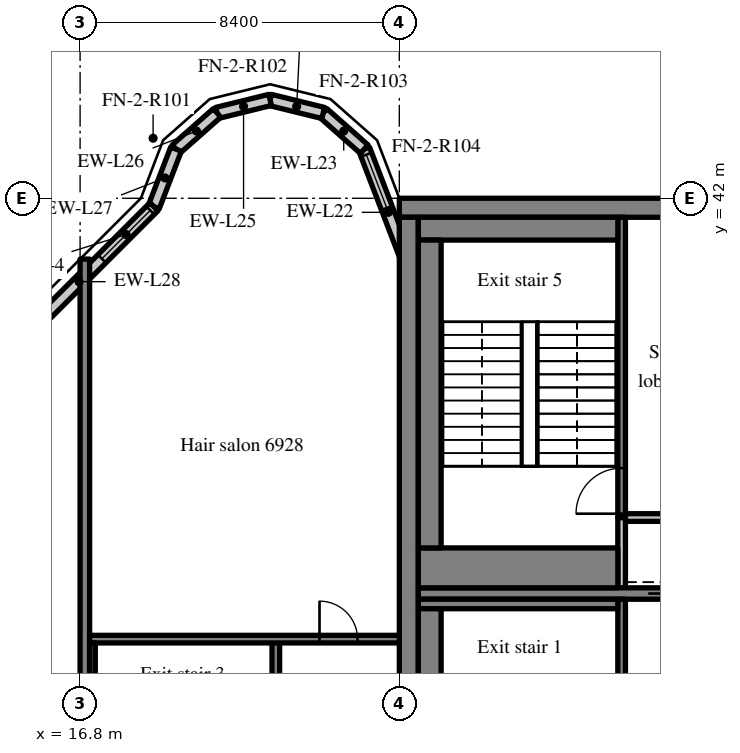
"""IFC4 building model, lengths in metres.
Left out: names, types, materials, properties, quantities, classifications, styles, units other than length and angle.
Written with IfcOpenShell. Run it as: python <this file> out.ifc"""

import sys

from ifc_helpers import new_model, si_unit, direction, frame, frame_2d, origin, place, context, subcontext, project, spatial, rectangle, extrude, source, transform, mapped, element, fill, save


model = new_model("IFC4")
c1 = context("Model", 3, precision=1e-05, world=origin(), true_north=direction((0.0, 1.0)))
c2 = subcontext(c1, "Body", "Model", "MODEL_VIEW")
j1 = project(units=[si_unit("LENGTHUNIT", "METRE"), si_unit("PLANEANGLEUNIT", "RADIAN")], contexts=[c1])
p1 = place(None, origin())
s1 = spatial("IfcSite", under=j1, at=p1, CompositionType="ELEMENT")
p2 = place(p1, origin())
s2 = spatial("IfcBuilding", under=s1, at=p2, CompositionType="ELEMENT")
p3 = place(p2, frame((0.0, 0.0, 289.7)))
s3 = spatial("IfcBuildingStorey", under=s2, at=p3, CompositionType="ELEMENT", Elevation=289.7)
m1 = source(origin(), c2, "Body", "SweptSolid", [
    extrude(rectangle(XDim=50.4, YDim=0.5, at=frame_2d((25.2, 0.0))), origin(), (0.0, 0.0, 1.0), 3.72),
])
p4 = place(p3, frame((25.2, 41.75, 0.0), z_axis=(0.0, 0.0, 1.0), x_axis=(1.0, 0.0, 0.0)))
e1 = element("IfcWall", 1, at=p4, inside=s3, PredefinedType="SHEAR", context=c2, shape_type="MappedRepresentation", body=[
    mapped(m1, transform((0.0, 0.0, 0.0), scale=1.0)),
])
m2 = source(origin(), c2, "Body", "SweptSolid", [
    extrude(rectangle(XDim=19.0, YDim=0.5, at=frame_2d((9.5, 0.0))), origin(), (0.0, 0.0, 1.0), 3.72),
])
p5 = place(p3, frame((25.45, 22.5, 0.0), z_axis=(0.0, 0.0, 1.0), x_axis=(0.0, 1.0, 0.0)))
e2 = element("IfcWall", 2, at=p5, inside=s3, PredefinedType="SHEAR", context=c2, shape_type="MappedRepresentation", body=[
    mapped(m2, transform((0.0, 0.0, 0.0), scale=1.0)),
])
m3 = source(origin(), c2, "Body", "SweptSolid", [
    extrude(rectangle(XDim=7.75, YDim=0.3, at=frame_2d((3.875, 0.0))), origin(), (0.0, 0.0, 1.0), 3.72),
])
p6 = place(p3, frame((25.7, 31.6, 0.0), z_axis=(0.0, 0.0, 1.0), x_axis=(1.0, 0.0, 0.0)))
e3 = element("IfcWall", 3, at=p6, inside=s3, PredefinedType="SHEAR", context=c2, shape_type="MappedRepresentation", body=[
    mapped(m3, transform((0.0, 0.0, 0.0), scale=1.0)),
])
m4 = source(origin(), c2, "Body", "SweptSolid", [
    extrude(rectangle(XDim=1.1, YDim=2.1, at=frame_2d((0.55, 1.05))), frame((0.0, 0.16, 0.0), z_axis=(0.0, -1.0, 0.0), x_axis=(1.0, 0.0, 0.0)), (0.0, 0.0, 1.0), 0.32),
])
p7 = place(p6, frame((6.05, 0.0, 0.0)))
e4 = element("IfcOpeningElement", 4, at=p7, cuts=e3, PredefinedType="OPENING", context=c2, shape_type="MappedRepresentation", body=[
    mapped(m4, transform((0.0, 0.0, 0.0), scale=1.0)),
])
m5 = source(origin(), c2, "Body", "SweptSolid", [
    extrude(rectangle(XDim=18.4, YDim=0.25, at=frame_2d((9.2, 0.0))), origin(), (0.0, 0.0, 1.0), 3.72),
])
p8 = place(p3, frame((16.925, 22.0, 0.0), z_axis=(0.0, 0.0, 1.0), x_axis=(0.0, 1.0, 0.0)))
e5 = element("IfcWall", 5, at=p8, inside=s3, PredefinedType="SHEAR", context=c2, shape_type="MappedRepresentation", body=[
    mapped(m5, transform((0.0, 0.0, 0.0), scale=1.0)),
])
m6 = source(origin(), c2, "Body", "SweptSolid", [
    extrude(rectangle(XDim=3.559, YDim=0.3, at=frame_2d((1.78, 0.0))), origin(), (0.0, 0.0, 1.0), 3.72),
])
p9 = place(p3, frame((25.55, 39.969, 0.0), z_axis=(0.0, 0.0, 1.0), x_axis=(-0.35779745313, 0.933799219604, 0.0)))
e6 = element("IfcWall", 6, at=p9, inside=s3, PredefinedType="SOLIDWALL", context=c2, shape_type="MappedRepresentation", body=[
    mapped(m6, transform((0.0, 0.0, 0.0), scale=1.0)),
])
m7 = source(origin(), c2, "Body", "SweptSolid", [
    extrude(rectangle(XDim=1.5, YDim=2.0, at=frame_2d((0.75, 1.0))), frame((0.0, 0.16, 0.0), z_axis=(0.0, -1.0, 0.0), x_axis=(1.0, 0.0, 0.0)), (0.0, 0.0, 1.0), 0.32),
])
p10 = place(p9, frame((1.903, 0.0, 0.9)))
e7 = element("IfcOpeningElement", 7, at=p10, cuts=e6, PredefinedType="OPENING", context=c2, shape_type="MappedRepresentation", body=[
    mapped(m7, transform((0.0, 0.0, 0.0), scale=1.0)),
])
m8 = source(origin(), c2, "Body", "SweptSolid", [
    extrude(rectangle(XDim=1.44, YDim=0.3, at=frame_2d((0.72, 0.0))), origin(), (0.0, 0.0, 1.0), 3.72),
])
p11 = place(p3, frame((24.277, 43.292, 0.0), z_axis=(0.0, 0.0, 1.0), x_axis=(-0.749649827867, 0.661834673902, 0.0)))
e8 = element("IfcWall", 8, at=p11, inside=s3, PredefinedType="SOLIDWALL", context=c2, shape_type="MappedRepresentation", body=[
    mapped(m8, transform((0.0, 0.0, 0.0), scale=1.0)),
])
m9 = source(origin(), c2, "Body", "SweptSolid", [
    extrude(rectangle(XDim=1.438, YDim=0.3, at=frame_2d((0.719, 0.0))), origin(), (0.0, 0.0, 1.0), 3.72),
])
p12 = place(p3, frame((23.197, 44.245, 0.0), z_axis=(0.0, 0.0, 1.0), x_axis=(-0.971152283879, 0.238460146601, 0.0)))
e9 = element("IfcWall", 9, at=p12, inside=s3, PredefinedType="SOLIDWALL", context=c2, shape_type="MappedRepresentation", body=[
    mapped(m9, transform((0.0, 0.0, 0.0), scale=1.0)),
])
m10 = source(origin(), c2, "Body", "SweptSolid", [
    extrude(rectangle(XDim=1.439, YDim=0.3, at=frame_2d((0.719, 0.0))), origin(), (0.0, 0.0, 1.0), 3.72),
])
p13 = place(p3, frame((21.8, 44.588, 0.0), z_axis=(0.0, 0.0, 1.0), x_axis=(-0.971161932466, -0.238420848351, 0.0)))
e10 = element("IfcWall", 10, at=p13, inside=s3, PredefinedType="SOLIDWALL", context=c2, shape_type="MappedRepresentation", body=[
    mapped(m10, transform((0.0, 0.0, 0.0), scale=1.0)),
])
m11 = source(origin(), c2, "Body", "SweptSolid", [
    extrude(rectangle(XDim=1.44, YDim=0.3, at=frame_2d((0.72, 0.0))), origin(), (0.0, 0.0, 1.0), 3.72),
])
p14 = place(p3, frame((20.403, 44.245, 0.0), z_axis=(0.0, 0.0, 1.0), x_axis=(-0.74957555648, -0.661918790432, 0.0)))
e11 = element("IfcWall", 11, at=p14, inside=s3, PredefinedType="SOLIDWALL", context=c2, shape_type="MappedRepresentation", body=[
    mapped(m11, transform((0.0, 0.0, 0.0), scale=1.0)),
])
m12 = source(origin(), c2, "Body", "SweptSolid", [
    extrude(rectangle(XDim=1.622, YDim=0.3, at=frame_2d((0.811, 0.0))), origin(), (0.0, 0.0, 1.0), 3.72),
])
p15 = place(p3, frame((19.323, 43.292, 0.0), z_axis=(0.0, 0.0, 1.0), x_axis=(-0.357778527068, -0.933806471154, 0.0)))
e12 = element("IfcWall", 12, at=p15, inside=s3, PredefinedType="SOLIDWALL", context=c2, shape_type="MappedRepresentation", body=[
    mapped(m12, transform((0.0, 0.0, 0.0), scale=1.0)),
])
m13 = source(origin(), c2, "Body", "SweptSolid", [
    extrude(rectangle(XDim=5.576, YDim=0.3, at=frame_2d((2.788, 0.0))), origin(), (0.0, 0.0, 1.0), 3.72),
])
p16 = place(p3, frame((18.743, 41.777, 0.0), z_axis=(0.0, 0.0, 1.0), x_axis=(-0.707106781187, -0.707106781187, 0.0)))
e13 = element("IfcWall", 13, at=p16, inside=s3, PredefinedType="SOLIDWALL", context=c2, shape_type="MappedRepresentation", body=[
    mapped(m13, transform((0.0, 0.0, 0.0), scale=1.0)),
])
m14 = source(origin(), c2, "Body", "SweptSolid", [
    extrude(rectangle(XDim=1.8, YDim=1.5, at=frame_2d((0.9, 0.75))), frame((0.0, 0.16, 0.0), z_axis=(0.0, -1.0, 0.0), x_axis=(1.0, 0.0, 0.0)), (0.0, 0.0, 1.0), 0.32),
])
p17 = place(p16, frame((0.135, 0.0, 0.9)))
e14 = element("IfcOpeningElement", 14, at=p17, cuts=e13, PredefinedType="OPENING", context=c2, shape_type="MappedRepresentation", body=[
    mapped(m14, transform((0.0, 0.0, 0.0), scale=1.0)),
])
m15 = source(origin(), c2, "Body", "SweptSolid", [
    extrude(rectangle(XDim=8.95, YDim=0.2, at=frame_2d((4.475, 0.0))), origin(), (0.0, 0.0, 1.0), 3.72),
])
p18 = place(p3, frame((31.05, 22.5, 0.0), z_axis=(0.0, 0.0, 1.0), x_axis=(0.0, 1.0, 0.0)))
e15 = element("IfcWall", 15, at=p18, inside=s3, PredefinedType="SOLIDWALL", context=c2, shape_type="MappedRepresentation", body=[
    mapped(m15, transform((0.0, 0.0, 0.0), scale=1.0)),
])
m16 = source(origin(), c2, "Body", "SweptSolid", [
    extrude(rectangle(XDim=1.2, YDim=2.1, at=frame_2d((0.6, 1.05))), frame((0.0, 0.11, 0.0), z_axis=(0.0, -1.0, 0.0), x_axis=(1.0, 0.0, 0.0)), (0.0, 0.0, 1.0), 0.22),
])
p19 = place(p18, frame((1.1, 0.0, 0.0)))
e16 = element("IfcOpeningElement", 16, at=p19, cuts=e15, PredefinedType="OPENING", context=c2, shape_type="MappedRepresentation", body=[
    mapped(m16, transform((0.0, 0.0, 0.0), scale=1.0)),
])
m17 = source(origin(), c2, "Body", "SweptSolid", [
    extrude(rectangle(XDim=1.85, YDim=0.2, at=frame_2d((0.925, 0.0))), origin(), (0.0, 0.0, 1.0), 3.72),
])
p20 = place(p3, frame((31.05, 31.75, 0.0), z_axis=(0.0, 0.0, 1.0), x_axis=(0.0, 1.0, 0.0)))
e17 = element("IfcWall", 17, at=p20, inside=s3, PredefinedType="SOLIDWALL", context=c2, shape_type="MappedRepresentation", body=[
    mapped(m17, transform((0.0, 0.0, 0.0), scale=1.0)),
])
m18 = source(origin(), c2, "Body", "SweptSolid", [
    extrude(rectangle(XDim=2.3, YDim=0.2, at=frame_2d((1.15, 0.0))), origin(), (0.0, 0.0, 1.0), 3.72),
])
p21 = place(p3, frame((31.15, 33.6, 0.0), z_axis=(0.0, 0.0, 1.0), x_axis=(1.0, 0.0, 0.0)))
e18 = element("IfcWall", 18, at=p21, inside=s3, PredefinedType="SOLIDWALL", context=c2, shape_type="MappedRepresentation", body=[
    mapped(m18, transform((0.0, 0.0, 0.0), scale=1.0)),
])
m19 = source(origin(), c2, "Body", "SweptSolid", [
    extrude(rectangle(XDim=7.9, YDim=0.2, at=frame_2d((3.95, 0.0))), origin(), (0.0, 0.0, 1.0), 3.72),
])
p22 = place(p3, frame((31.05, 33.6, 0.0), z_axis=(0.0, 0.0, 1.0), x_axis=(0.0, 1.0, 0.0)))
e19 = element("IfcWall", 19, at=p22, inside=s3, PredefinedType="SOLIDWALL", context=c2, shape_type="MappedRepresentation", body=[
    mapped(m19, transform((0.0, 0.0, 0.0), scale=1.0)),
])
p23 = place(p22, frame((0.1, 0.0, 0.0)))
e20 = element("IfcOpeningElement", 20, at=p23, cuts=e19, PredefinedType="OPENING", context=c2, shape_type="MappedRepresentation", body=[
    mapped(m16, transform((0.0, 0.0, 0.0), scale=1.0)),
])
m20 = source(origin(), c2, "Body", "SweptSolid", [
    extrude(rectangle(XDim=8.3, YDim=0.2, at=frame_2d((4.15, 0.0))), origin(), (0.0, 0.0, 1.0), 3.72),
])
p24 = place(p3, frame((21.95, 22.1, 0.0), z_axis=(0.0, 0.0, 1.0), x_axis=(0.0, 1.0, 0.0)))
e21 = element("IfcWall", 21, at=p24, inside=s3, PredefinedType="SOLIDWALL", context=c2, shape_type="MappedRepresentation", body=[
    mapped(m20, transform((0.0, 0.0, 0.0), scale=1.0)),
])
p25 = place(p24, frame((0.6, 0.0, 0.0)))
e22 = element("IfcOpeningElement", 22, at=p25, cuts=e21, PredefinedType="OPENING", context=c2, shape_type="MappedRepresentation", body=[
    mapped(m16, transform((0.0, 0.0, 0.0), scale=1.0)),
])
m21 = source(origin(), c2, "Body", "SweptSolid", [
    extrude(rectangle(XDim=8.15, YDim=0.2, at=frame_2d((4.075, 0.0))), origin(), (0.0, 0.0, 1.0), 3.72),
])
p26 = place(p3, frame((17.05, 30.4, 0.0), z_axis=(0.0, 0.0, 1.0), x_axis=(1.0, 0.0, 0.0)))
e23 = element("IfcWall", 23, at=p26, inside=s3, PredefinedType="SOLIDWALL", context=c2, shape_type="MappedRepresentation", body=[
    mapped(m21, transform((0.0, 0.0, 0.0), scale=1.0)),
])
m22 = source(origin(), c2, "Body", "SweptSolid", [
    extrude(rectangle(XDim=1.0, YDim=2.1, at=frame_2d((0.5, 1.05))), frame((0.0, 0.11, 0.0), z_axis=(0.0, -1.0, 0.0), x_axis=(1.0, 0.0, 0.0)), (0.0, 0.0, 1.0), 0.22),
])
p27 = place(p26, frame((6.05, 0.0, 0.0)))
e24 = element("IfcOpeningElement", 24, at=p27, cuts=e23, PredefinedType="OPENING", context=c2, shape_type="MappedRepresentation", body=[
    mapped(m22, transform((0.0, 0.0, 0.0), scale=1.0)),
])
m23 = source(origin(), c2, "Body", "SweptSolid", [
    extrude(rectangle(XDim=5.25, YDim=0.25, at=frame_2d((2.625, 0.0))), origin(), (0.0, 0.0, 1.0), 3.72),
])
p28 = place(p3, frame((25.7, 31.325, 0.0), z_axis=(0.0, 0.0, 1.0), x_axis=(1.0, 0.0, 0.0)))
e25 = element("IfcWall", 25, at=p28, inside=s3, PredefinedType="SOLIDWALL", context=c2, shape_type="MappedRepresentation", body=[
    mapped(m23, transform((0.0, 0.0, 0.0), scale=1.0)),
])
m24 = source(origin(), c2, "Body", "SweptSolid", [
    extrude(rectangle(XDim=8.1, YDim=0.6, at=frame_2d((4.05, 0.0))), origin(), (0.0, 0.0, 1.0), 3.72),
])
p29 = place(p3, frame((26.0, 23.1, 0.0), z_axis=(0.0, 0.0, 1.0), x_axis=(0.0, 1.0, 0.0)))
e26 = element("IfcWall", 26, at=p29, inside=s3, PredefinedType="SOLIDWALL", context=c2, shape_type="MappedRepresentation", body=[
    mapped(m24, transform((0.0, 0.0, 0.0), scale=1.0)),
])
m25 = source(origin(), c2, "Body", "SweptSolid", [
    extrude(rectangle(XDim=8.1, YDim=0.15, at=frame_2d((4.05, 0.0))), origin(), (0.0, 0.0, 1.0), 3.72),
])
p30 = place(p3, frame((17.125, 22.2, 0.0), z_axis=(0.0, 0.0, 1.0), x_axis=(0.0, 1.0, 0.0)))
e27 = element("IfcWall", 27, at=p30, inside=s3, PredefinedType="SOLIDWALL", context=c2, shape_type="MappedRepresentation", body=[
    mapped(m25, transform((0.0, 0.0, 0.0), scale=1.0)),
])
m26 = source(origin(), c2, "Body", "SweptSolid", [
    extrude(rectangle(XDim=5.25, YDim=0.6, at=frame_2d((2.625, 0.0))), origin(), (0.0, 0.0, 1.0), 3.72),
])
p31 = place(p3, frame((25.7, 41.2, 0.0), z_axis=(0.0, 0.0, 1.0), x_axis=(1.0, 0.0, 0.0)))
e28 = element("IfcWall", 28, at=p31, inside=s3, PredefinedType="SOLIDWALL", context=c2, shape_type="MappedRepresentation", body=[
    mapped(m26, transform((0.0, 0.0, 0.0), scale=1.0)),
])
m27 = source(origin(), c2, "Body", "SweptSolid", [
    extrude(rectangle(XDim=5.25, YDim=1.05, at=frame_2d((2.625, 0.0))), origin(), (0.0, 0.0, 1.0), 3.72),
])
p32 = place(p3, frame((25.7, 32.275, 0.0), z_axis=(0.0, 0.0, 1.0), x_axis=(1.0, 0.0, 0.0)))
e29 = element("IfcWall", 29, at=p32, inside=s3, PredefinedType="SOLIDWALL", context=c2, shape_type="MappedRepresentation", body=[
    mapped(m27, transform((0.0, 0.0, 0.0), scale=1.0)),
])
p33 = place(p3, frame((26.0, 32.8, 0.0), z_axis=(0.0, 0.0, 1.0), x_axis=(0.0, 1.0, 0.0)))
e30 = element("IfcWall", 30, at=p33, inside=s3, PredefinedType="SOLIDWALL", context=c2, shape_type="MappedRepresentation", body=[
    mapped(m24, transform((0.0, 0.0, 0.0), scale=1.0)),
])
m28 = source(origin(), c2, "Body", "SweptSolid", [
    extrude(rectangle(XDim=1.5, YDim=2.0, at=frame_2d((0.75, 1.0))), frame((0.0, 0.03, 0.0), z_axis=(0.0, -1.0, 0.0), x_axis=(1.0, 0.0, 0.0)), (0.0, 0.0, 1.0), 0.06),
])
p34 = place(p10, origin())
e31 = element("IfcWindow", 31, at=p34, inside=s3, PartitioningType="SINGLE_PANEL", PredefinedType="WINDOW", context=c2, shape_type="MappedRepresentation", body=[
    mapped(m28, transform((0.0, 0.0, 0.0), scale=1.0)),
])
fill(e7, e31)
m29 = source(origin(), c2, "Body", "SweptSolid", [
    extrude(rectangle(XDim=1.8, YDim=1.5, at=frame_2d((0.9, 0.75))), frame((0.0, 0.03, 0.0), z_axis=(0.0, -1.0, 0.0), x_axis=(1.0, 0.0, 0.0)), (0.0, 0.0, 1.0), 0.06),
])
p35 = place(p17, origin())
e32 = element("IfcWindow", 32, at=p35, inside=s3, PartitioningType="SINGLE_PANEL", PredefinedType="WINDOW", context=c2, shape_type="MappedRepresentation", body=[
    mapped(m29, transform((0.0, 0.0, 0.0), scale=1.0)),
])
fill(e14, e32)
m30 = source(origin(), c2, "Body", "SweptSolid", [
    extrude(rectangle(XDim=1.1, YDim=2.1, at=frame_2d((0.55, 1.05))), frame((0.0, 0.025, 0.0), z_axis=(0.0, -1.0, 0.0), x_axis=(1.0, 0.0, 0.0)), (0.0, 0.0, 1.0), 0.05),
])
p36 = place(p7, origin())
e33 = element("IfcDoor", 33, at=p36, inside=s3, OperationType="SLIDING_TO_LEFT", PredefinedType="DOOR", context=c2, shape_type="MappedRepresentation", body=[
    mapped(m30, transform((0.0, 0.0, 0.0), scale=1.0)),
])
fill(e4, e33)
m31 = source(origin(), c2, "Body", "SweptSolid", [
    extrude(rectangle(XDim=1.2, YDim=2.1, at=frame_2d((0.6, 1.05))), frame((0.0, 0.025, 0.0), z_axis=(0.0, -1.0, 0.0), x_axis=(1.0, 0.0, 0.0)), (0.0, 0.0, 1.0), 0.05),
])
p37 = place(p23, origin())
e34 = element("IfcDoor", 34, at=p37, inside=s3, OperationType="SINGLE_SWING_LEFT", PredefinedType="DOOR", context=c2, shape_type="MappedRepresentation", body=[
    mapped(m31, transform((0.0, 0.0, 0.0), scale=1.0)),
])
fill(e20, e34)
m32 = source(origin(), c2, "Body", "SweptSolid", [
    extrude(rectangle(XDim=1.0, YDim=2.1, at=frame_2d((0.5, 1.05))), frame((0.0, 0.025, 0.0), z_axis=(0.0, -1.0, 0.0), x_axis=(1.0, 0.0, 0.0)), (0.0, 0.0, 1.0), 0.05),
])
p38 = place(p27, origin())
e35 = element("IfcDoor", 35, at=p38, inside=s3, OperationType="SINGLE_SWING_LEFT", PredefinedType="DOOR", context=c2, shape_type="MappedRepresentation", body=[
    mapped(m32, transform((0.0, 0.0, 0.0), scale=1.0)),
])
fill(e24, e35)
save(model, sys.argv[1])
